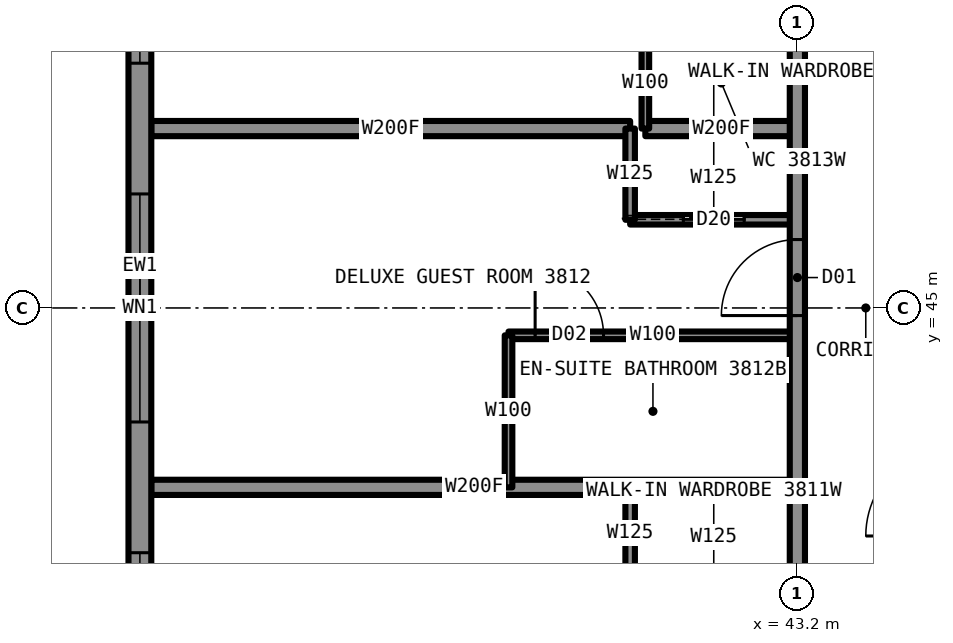
"""IFC4 building model, lengths in metres.
Left out: names, types, materials, properties, quantities, classifications, styles, units other than length and angle.
Written with IfcOpenShell. Run it as: python <this file> out.ifc"""

import sys

from ifc_helpers import new_model, si_unit, direction, frame, frame_2d, origin, place, context, subcontext, project, spatial, rectangle, extrude, element, fill, save


model = new_model("IFC4")
c1 = context("Model", 3, precision=1e-05, world=origin(), true_north=direction((0.0, 1.0)))
c2 = subcontext(c1, "Body", "Model", "MODEL_VIEW")
j1 = project(units=[si_unit("LENGTHUNIT", "METRE"), si_unit("PLANEANGLEUNIT", "RADIAN")], contexts=[c1])
p1 = place(None, origin())
s1 = spatial("IfcSite", under=j1, at=p1, CompositionType="ELEMENT")
p2 = place(p1, origin())
s2 = spatial("IfcBuilding", under=s1, at=p2, CompositionType="ELEMENT")
p3 = place(p2, frame((0.0, 0.0, 135.4)))
s3 = spatial("IfcBuildingStorey", under=s2, at=p3, CompositionType="ELEMENT", Elevation=135.4)
p4 = place(p3, frame((39.4, 44.64, 0.0), z_axis=(0.0, 0.0, 1.0), x_axis=(1.0, 0.0, 0.0)))
e1 = element("IfcWall", 1, at=p4, inside=s3, PredefinedType="PARTITIONING", context=c2, shape_type="SweptSolid", body=[
    extrude(rectangle(XDim=3.8, YDim=0.1, at=frame_2d((1.9, 0.0))), origin(), (0.0, 0.0, 1.0), 3.33),
])
p5 = place(p4, frame((0.35, 0.0, 0.0)))
e2 = element("IfcOpeningElement", 2, at=p5, cuts=e1, PredefinedType="OPENING", context=c2, shape_type="SweptSolid", body=[
    extrude(rectangle(XDim=0.9, YDim=2.1, at=frame_2d((0.45, 1.05))), frame((0.0, 0.06, 0.0), z_axis=(0.0, -1.0, 0.0), x_axis=(1.0, 0.0, 0.0)), (0.0, 0.0, 1.0), 0.12),
])
p6 = place(p3, frame((34.7, 42.64, 0.0), z_axis=(0.0, 0.0, 1.0), x_axis=(1.0, 0.0, 0.0)))
e3 = element("IfcWall", 3, at=p6, inside=s3, PredefinedType="PARTITIONING", context=c2, shape_type="SweptSolid", body=[
    extrude(rectangle(XDim=8.5, YDim=0.2, at=frame_2d((4.25, 0.0))), origin(), (0.0, 0.0, 1.0), 2.731),
])
p7 = place(p3, frame((41.0, 46.16, 0.0), z_axis=(0.0, 0.0, 1.0), x_axis=(1.0, 0.0, 0.0)))
e4 = element("IfcWall", 4, at=p7, inside=s3, PredefinedType="PARTITIONING", context=c2, shape_type="SweptSolid", body=[
    extrude(rectangle(XDim=2.2, YDim=0.125, at=frame_2d((1.1, 0.0))), origin(), (0.0, 0.0, 1.0), 3.33),
])
p8 = place(p7, frame((0.7, 0.0, 0.0)))
e5 = element("IfcOpeningElement", 5, at=p8, cuts=e4, PredefinedType="OPENING", context=c2, shape_type="SweptSolid", body=[
    extrude(rectangle(XDim=0.8, YDim=2.1, at=frame_2d((0.4, 1.05))), frame((0.0, 0.073, 0.0), z_axis=(0.0, -1.0, 0.0), x_axis=(1.0, 0.0, 0.0)), (0.0, 0.0, 1.0), 0.145),
])
p9 = place(p3, frame((34.7, 47.36, 0.0), z_axis=(0.0, 0.0, 1.0), x_axis=(1.0, 0.0, 0.0)))
e6 = element("IfcWall", 6, at=p9, inside=s3, PredefinedType="PARTITIONING", context=c2, shape_type="SweptSolid", body=[
    extrude(rectangle(XDim=6.3, YDim=0.2, at=frame_2d((3.15, 0.0))), origin(), (0.0, 0.0, 1.0), 2.731),
])
p10 = place(p3, frame((41.2, 47.36, 0.0), z_axis=(0.0, 0.0, 1.0), x_axis=(1.0, 0.0, 0.0)))
e7 = element("IfcWall", 7, at=p10, inside=s3, PredefinedType="PARTITIONING", context=c2, shape_type="SweptSolid", body=[
    extrude(rectangle(XDim=2.0, YDim=0.2, at=frame_2d((1.0, 0.0))), origin(), (0.0, 0.0, 1.0), 2.731),
])
p11 = place(p3, frame((43.2, 33.2, 0.0), z_axis=(0.0, 0.0, 1.0), x_axis=(0.0, 1.0, 0.0)))
e8 = element("IfcWall", 8, at=p11, inside=s3, PredefinedType="PARTITIONING", context=c2, shape_type="SweptSolid", body=[
    extrude(rectangle(XDim=23.6, YDim=0.2, at=frame_2d((11.8, 0.0))), origin(), (0.0, 0.0, 1.0), 3.33),
])
p12 = place(p11, frame((6.98, 0.0, 0.0)))
e9 = element("IfcOpeningElement", 9, at=p12, cuts=e8, PredefinedType="OPENING", context=c2, shape_type="SweptSolid", body=[
    extrude(rectangle(XDim=1.0, YDim=2.2, at=frame_2d((0.5, 1.1))), frame((0.0, 0.11, 0.0), z_axis=(0.0, -1.0, 0.0), x_axis=(1.0, 0.0, 0.0)), (0.0, 0.0, 1.0), 0.22),
])
p13 = place(p11, frame((11.7, 0.0, 0.0)))
e10 = element("IfcOpeningElement", 10, at=p13, cuts=e8, PredefinedType="OPENING", context=c2, shape_type="SweptSolid", body=[
    extrude(rectangle(XDim=1.0, YDim=2.2, at=frame_2d((0.5, 1.1))), frame((0.0, 0.11, 0.0), z_axis=(0.0, -1.0, 0.0), x_axis=(1.0, 0.0, 0.0)), (0.0, 0.0, 1.0), 0.22),
])
p14 = place(p11, frame((15.62, 0.0, 0.0)))
e11 = element("IfcOpeningElement", 11, at=p14, cuts=e8, PredefinedType="OPENING", context=c2, shape_type="SweptSolid", body=[
    extrude(rectangle(XDim=1.0, YDim=2.2, at=frame_2d((0.5, 1.1))), frame((0.0, 0.11, 0.0), z_axis=(0.0, -1.0, 0.0), x_axis=(1.0, 0.0, 0.0)), (0.0, 0.0, 1.0), 0.22),
])
p15 = place(p11, frame((21.85, 0.0, 0.0)))
e12 = element("IfcOpeningElement", 12, at=p15, cuts=e8, PredefinedType="OPENING", context=c2, shape_type="SweptSolid", body=[
    extrude(rectangle(XDim=1.1, YDim=2.2, at=frame_2d((0.55, 1.1))), frame((0.0, 0.11, 0.0), z_axis=(0.0, -1.0, 0.0), x_axis=(1.0, 0.0, 0.0)), (0.0, 0.0, 1.0), 0.22),
])
p16 = place(p11, frame((0.65, 0.0, 0.0)))
e13 = element("IfcOpeningElement", 13, at=p16, cuts=e8, PredefinedType="OPENING", context=c2, shape_type="SweptSolid", body=[
    extrude(rectangle(XDim=1.1, YDim=2.2, at=frame_2d((0.55, 1.1))), frame((0.0, 0.11, 0.0), z_axis=(0.0, -1.0, 0.0), x_axis=(1.0, 0.0, 0.0)), (0.0, 0.0, 1.0), 0.22),
])
p17 = place(p3, frame((41.2, 47.36, 0.0), z_axis=(0.0, 0.0, 1.0), x_axis=(0.0, 1.0, 0.0)))
e14 = element("IfcWall", 14, at=p17, inside=s3, PredefinedType="PARTITIONING", context=c2, shape_type="SweptSolid", body=[
    extrude(rectangle(XDim=1.2, YDim=0.1, at=frame_2d((0.6, 0.0))), origin(), (0.0, 0.0, 1.0), 3.33),
])
p18 = place(p3, frame((41.0, 41.44, 0.0), z_axis=(0.0, 0.0, 1.0), x_axis=(0.0, 1.0, 0.0)))
e15 = element("IfcWall", 15, at=p18, inside=s3, PredefinedType="PARTITIONING", context=c2, shape_type="SweptSolid", body=[
    extrude(rectangle(XDim=1.2, YDim=0.125, at=frame_2d((0.6, 0.0))), origin(), (0.0, 0.0, 1.0), 3.33),
])
p19 = place(p3, frame((41.0, 46.16, 0.0), z_axis=(0.0, 0.0, 1.0), x_axis=(0.0, 1.0, 0.0)))
e16 = element("IfcWall", 16, at=p19, inside=s3, PredefinedType="PARTITIONING", context=c2, shape_type="SweptSolid", body=[
    extrude(rectangle(XDim=1.2, YDim=0.125, at=frame_2d((0.6, 0.0))), origin(), (0.0, 0.0, 1.0), 3.33),
])
p20 = place(p3, frame((39.4, 42.64, 0.0), z_axis=(0.0, 0.0, 1.0), x_axis=(0.0, 1.0, 0.0)))
e17 = element("IfcWall", 17, at=p20, inside=s3, PredefinedType="PARTITIONING", context=c2, shape_type="SweptSolid", body=[
    extrude(rectangle(XDim=2.0, YDim=0.1, at=frame_2d((1.0, 0.0))), origin(), (0.0, 0.0, 1.0), 3.33),
])
p21 = place(p3, frame((34.55, 60.1, 0.0), z_axis=(0.0, 0.0, 1.0), x_axis=(0.0, -1.0, 0.0)))
e18 = element("IfcWall", 18, at=p21, inside=s3, PredefinedType="SOLIDWALL", context=c2, shape_type="SweptSolid", body=[
    extrude(rectangle(XDim=30.2, YDim=0.3, at=frame_2d((15.1, 0.0))), origin(), (0.0, 0.0, 1.0), 2.83),
])
p22 = place(p21, frame((0.85, 0.0, 0.5)))
e19 = element("IfcOpeningElement", 19, at=p22, cuts=e18, PredefinedType="OPENING", context=c2, shape_type="SweptSolid", body=[
    extrude(rectangle(XDim=1.6, YDim=2.0, at=frame_2d((0.8, 1.0))), frame((0.0, 0.16, 0.0), z_axis=(0.0, -1.0, 0.0), x_axis=(1.0, 0.0, 0.0)), (0.0, 0.0, 1.0), 0.32),
])
p23 = place(p21, frame((4.16, 0.0, 0.5)))
e20 = element("IfcOpeningElement", 20, at=p23, cuts=e18, PredefinedType="OPENING", context=c2, shape_type="SweptSolid", body=[
    extrude(rectangle(XDim=1.3, YDim=1.9, at=frame_2d((0.65, 0.95))), frame((0.0, 0.16, 0.0), z_axis=(0.0, -1.0, 0.0), x_axis=(1.0, 0.0, 0.0)), (0.0, 0.0, 1.0), 0.32),
])
p24 = place(p21, frame((8.88, 0.0, 0.5)))
e21 = element("IfcOpeningElement", 21, at=p24, cuts=e18, PredefinedType="OPENING", context=c2, shape_type="SweptSolid", body=[
    extrude(rectangle(XDim=3.0, YDim=2.0, at=frame_2d((1.5, 1.0))), frame((0.0, 0.16, 0.0), z_axis=(0.0, -1.0, 0.0), x_axis=(1.0, 0.0, 0.0)), (0.0, 0.0, 1.0), 0.32),
])
p25 = place(p21, frame((13.6, 0.0, 0.5)))
e22 = element("IfcOpeningElement", 22, at=p25, cuts=e18, PredefinedType="OPENING", context=c2, shape_type="SweptSolid", body=[
    extrude(rectangle(XDim=3.0, YDim=2.0, at=frame_2d((1.5, 1.0))), frame((0.0, 0.16, 0.0), z_axis=(0.0, -1.0, 0.0), x_axis=(1.0, 0.0, 0.0)), (0.0, 0.0, 1.0), 0.32),
])
p26 = place(p21, frame((18.32, 0.0, 0.5)))
e23 = element("IfcOpeningElement", 23, at=p26, cuts=e18, PredefinedType="OPENING", context=c2, shape_type="SweptSolid", body=[
    extrude(rectangle(XDim=3.0, YDim=2.0, at=frame_2d((1.5, 1.0))), frame((0.0, 0.16, 0.0), z_axis=(0.0, -1.0, 0.0), x_axis=(1.0, 0.0, 0.0)), (0.0, 0.0, 1.0), 0.32),
])
p27 = place(p21, frame((24.69, 0.0, 0.5)))
e24 = element("IfcOpeningElement", 24, at=p27, cuts=e18, PredefinedType="OPENING", context=c2, shape_type="SweptSolid", body=[
    extrude(rectangle(XDim=1.3, YDim=1.9, at=frame_2d((0.65, 0.95))), frame((0.0, 0.16, 0.0), z_axis=(0.0, -1.0, 0.0), x_axis=(1.0, 0.0, 0.0)), (0.0, 0.0, 1.0), 0.32),
])
p28 = place(p21, frame((27.75, 0.0, 0.5)))
e25 = element("IfcOpeningElement", 25, at=p28, cuts=e18, PredefinedType="OPENING", context=c2, shape_type="SweptSolid", body=[
    extrude(rectangle(XDim=1.6, YDim=2.0, at=frame_2d((0.8, 1.0))), frame((0.0, 0.16, 0.0), z_axis=(0.0, -1.0, 0.0), x_axis=(1.0, 0.0, 0.0)), (0.0, 0.0, 1.0), 0.32),
])
p29 = place(p21, frame((5.51, 0.0, 0.5)))
e26 = element("IfcOpeningElement", 26, at=p29, cuts=e18, PredefinedType="OPENING", context=c2, shape_type="SweptSolid", body=[
    extrude(rectangle(XDim=0.7, YDim=0.9, at=frame_2d((0.35, 0.45))), frame((0.0, 0.16, 0.0), z_axis=(0.0, -1.0, 0.0), x_axis=(1.0, 0.0, 0.0)), (0.0, 0.0, 1.0), 0.32),
])
p30 = place(p21, frame((23.99, 0.0, 0.5)))
e27 = element("IfcOpeningElement", 27, at=p30, cuts=e18, PredefinedType="OPENING", context=c2, shape_type="SweptSolid", body=[
    extrude(rectangle(XDim=0.7, YDim=0.9, at=frame_2d((0.35, 0.45))), frame((0.0, 0.16, 0.0), z_axis=(0.0, -1.0, 0.0), x_axis=(1.0, 0.0, 0.0)), (0.0, 0.0, 1.0), 0.32),
])
p31 = place(p13, origin())
e28 = element("IfcDoor", 28, at=p31, inside=s3, OperationType="SINGLE_SWING_LEFT", PredefinedType="DOOR", context=c2, shape_type="SweptSolid", body=[
    extrude(rectangle(XDim=1.0, YDim=2.2, at=frame_2d((0.5, 1.1))), frame((0.0, 0.025, 0.0), z_axis=(0.0, -1.0, 0.0), x_axis=(1.0, 0.0, 0.0)), (0.0, 0.0, 1.0), 0.05),
])
fill(e10, e28)
p32 = place(p5, origin())
e29 = element("IfcDoor", 29, at=p32, inside=s3, OperationType="SINGLE_SWING_RIGHT", PredefinedType="DOOR", context=c2, shape_type="SweptSolid", body=[
    extrude(rectangle(XDim=0.9, YDim=2.1, at=frame_2d((0.45, 1.05))), frame((0.0, 0.025, 0.0), z_axis=(0.0, -1.0, 0.0), x_axis=(1.0, 0.0, 0.0)), (0.0, 0.0, 1.0), 0.05),
])
fill(e2, e29)
p33 = place(p8, origin())
e30 = element("IfcDoor", 30, at=p33, inside=s3, OperationType="SLIDING_TO_LEFT", PredefinedType="DOOR", context=c2, shape_type="SweptSolid", body=[
    extrude(rectangle(XDim=0.8, YDim=2.1, at=frame_2d((0.4, 1.05))), frame((0.0, 0.025, 0.0), z_axis=(0.0, -1.0, 0.0), x_axis=(1.0, 0.0, 0.0)), (0.0, 0.0, 1.0), 0.05),
])
fill(e5, e30)
p34 = place(p24, origin())
e31 = element("IfcWindow", 31, at=p34, inside=s3, PartitioningType="SINGLE_PANEL", PredefinedType="WINDOW", context=c2, shape_type="SweptSolid", body=[
    extrude(rectangle(XDim=3.0, YDim=2.0, at=frame_2d((1.5, 1.0))), frame((0.0, 0.03, 0.0), z_axis=(0.0, -1.0, 0.0), x_axis=(1.0, 0.0, 0.0)), (0.0, 0.0, 1.0), 0.06),
])
fill(e21, e31)
p35 = place(p25, origin())
e32 = element("IfcWindow", 32, at=p35, inside=s3, PartitioningType="SINGLE_PANEL", PredefinedType="WINDOW", context=c2, shape_type="SweptSolid", body=[
    extrude(rectangle(XDim=3.0, YDim=2.0, at=frame_2d((1.5, 1.0))), frame((0.0, 0.03, 0.0), z_axis=(0.0, -1.0, 0.0), x_axis=(1.0, 0.0, 0.0)), (0.0, 0.0, 1.0), 0.06),
])
fill(e22, e32)
p36 = place(p26, origin())
e33 = element("IfcWindow", 33, at=p36, inside=s3, PartitioningType="SINGLE_PANEL", PredefinedType="WINDOW", context=c2, shape_type="SweptSolid", body=[
    extrude(rectangle(XDim=3.0, YDim=2.0, at=frame_2d((1.5, 1.0))), frame((0.0, 0.03, 0.0), z_axis=(0.0, -1.0, 0.0), x_axis=(1.0, 0.0, 0.0)), (0.0, 0.0, 1.0), 0.06),
])
fill(e23, e33)
save(model, sys.argv[1])
